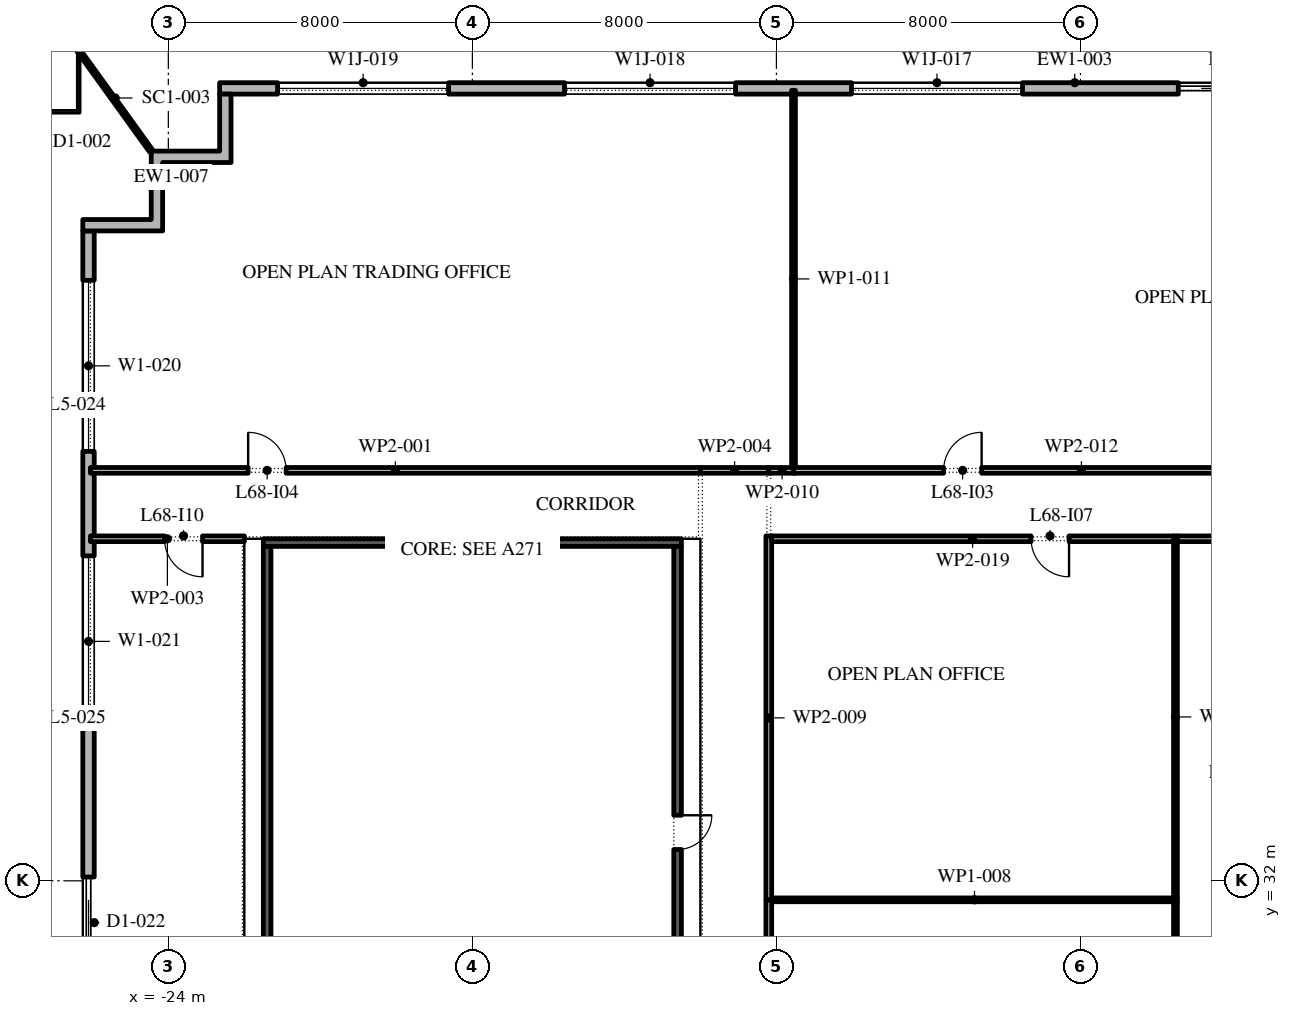
"""IFC4 building model, lengths in metres.
Left out: names, types, materials, properties, quantities, classifications, styles, units other than length and angle.
Written with IfcOpenShell. Run it as: python <this file> out.ifc"""

import sys

from ifc_helpers import new_model, si_unit, direction, frame, frame_2d, origin, place, context, subcontext, project, spatial, polyline, rectangle, outline, extrude, element, fill, save


model = new_model("IFC4")
c1 = context("Model", 3, precision=1e-05, world=origin(), true_north=direction((0.0, 1.0)))
c2 = subcontext(c1, "Body", "Model", "MODEL_VIEW")
j1 = project(units=[si_unit("LENGTHUNIT", "METRE"), si_unit("PLANEANGLEUNIT", "RADIAN")], contexts=[c1])
p1 = place(None, origin())
s1 = spatial("IfcSite", under=j1, at=p1, CompositionType="ELEMENT")
p2 = place(p1, origin())
s2 = spatial("IfcBuilding", under=s1, at=p2, CompositionType="ELEMENT")
p3 = place(p2, frame((0.0, 0.0, 313.2)))
s3 = spatial("IfcBuildingStorey", under=s2, at=p3, CompositionType="ELEMENT", Elevation=313.2)
p4 = place(p3, frame((22.35, 52.85, 0.0), z_axis=(0.0, 0.0, 1.0), x_axis=(-1.0, 0.0, 0.0)))
e1 = element("IfcWall", 1, at=p4, inside=s3, PredefinedType="STANDARD", context=c2, shape_type="SweptSolid", body=[
    extrude(rectangle(XDim=45.0, YDim=0.3, at=frame_2d((22.5, 0.0))), origin(), (0.0, 0.0, 1.0), 4.0),
])
p5 = place(p4, frame((1.375, 0.0, 0.45)))
e2 = element("IfcOpeningElement", 2, at=p5, cuts=e1, PredefinedType="OPENING", context=c2, shape_type="SweptSolid", body=[
    extrude(rectangle(XDim=4.5, YDim=2.675, at=frame_2d((2.25, 1.337))), frame((0.0, 0.16, 0.0), z_axis=(0.0, -1.0, 0.0), x_axis=(1.0, 0.0, 0.0)), (0.0, 0.0, 1.0), 0.32),
])
p6 = place(p4, frame((8.775, 0.0, 0.45)))
e3 = element("IfcOpeningElement", 3, at=p6, cuts=e1, PredefinedType="OPENING", context=c2, shape_type="SweptSolid", body=[
    extrude(rectangle(XDim=4.5, YDim=2.675, at=frame_2d((2.25, 1.337))), frame((0.0, 0.16, 0.0), z_axis=(0.0, -1.0, 0.0), x_axis=(1.0, 0.0, 0.0)), (0.0, 0.0, 1.0), 0.32),
])
p7 = place(p4, frame((17.375, 0.0, 0.0)))
e4 = element("IfcOpeningElement", 4, at=p7, cuts=e1, PredefinedType="OPENING", context=c2, shape_type="SweptSolid", body=[
    extrude(rectangle(XDim=2.4, YDim=3.125, at=frame_2d((1.2, 1.562))), frame((0.0, 0.16, 0.0), z_axis=(0.0, -1.0, 0.0), x_axis=(1.0, 0.0, 0.0)), (0.0, 0.0, 1.0), 0.32),
])
p8 = place(p4, frame((23.875, 0.0, 0.45)))
e5 = element("IfcOpeningElement", 5, at=p8, cuts=e1, PredefinedType="OPENING", context=c2, shape_type="SweptSolid", body=[
    extrude(rectangle(XDim=4.5, YDim=2.675, at=frame_2d((2.25, 1.337))), frame((0.0, 0.16, 0.0), z_axis=(0.0, -1.0, 0.0), x_axis=(1.0, 0.0, 0.0)), (0.0, 0.0, 1.0), 0.32),
])
p9 = place(p4, frame((31.425, 0.0, 0.45)))
e6 = element("IfcOpeningElement", 6, at=p9, cuts=e1, PredefinedType="OPENING", context=c2, shape_type="SweptSolid", body=[
    extrude(rectangle(XDim=4.5, YDim=2.675, at=frame_2d((2.25, 1.337))), frame((0.0, 0.16, 0.0), z_axis=(0.0, -1.0, 0.0), x_axis=(1.0, 0.0, 0.0)), (0.0, 0.0, 1.0), 0.32),
])
p10 = place(p4, frame((38.975, 0.0, 0.45)))
e7 = element("IfcOpeningElement", 7, at=p10, cuts=e1, PredefinedType="OPENING", context=c2, shape_type="SweptSolid", body=[
    extrude(rectangle(XDim=4.5, YDim=2.675, at=frame_2d((2.25, 1.337))), frame((0.0, 0.16, 0.0), z_axis=(0.0, -1.0, 0.0), x_axis=(1.0, 0.0, 0.0)), (0.0, 0.0, 1.0), 0.32),
])
p11 = place(p3, frame((-26.1, 49.1, 0.0), z_axis=(0.0, 0.0, 1.0), x_axis=(0.0, -1.0, 0.0)))
e8 = element("IfcWall", 8, at=p11, inside=s3, PredefinedType="STANDARD", context=c2, shape_type="SweptSolid", body=[
    extrude(rectangle(XDim=51.5, YDim=0.3, at=frame_2d((25.75, 0.0))), origin(), (0.0, 0.0, 1.0), 4.0),
])
p12 = place(p11, frame((1.3, 0.0, 0.45)))
e9 = element("IfcOpeningElement", 9, at=p12, cuts=e8, PredefinedType="OPENING", context=c2, shape_type="SweptSolid", body=[
    extrude(rectangle(XDim=4.5, YDim=3.05, at=frame_2d((2.25, 1.525))), frame((0.0, 0.16, 0.0), z_axis=(0.0, -1.0, 0.0), x_axis=(1.0, 0.0, 0.0)), (0.0, 0.0, 1.0), 0.32),
])
p13 = place(p11, frame((8.55, 0.0, 0.45)))
e10 = element("IfcOpeningElement", 10, at=p13, cuts=e8, PredefinedType="OPENING", context=c2, shape_type="SweptSolid", body=[
    extrude(rectangle(XDim=4.5, YDim=3.05, at=frame_2d((2.25, 1.525))), frame((0.0, 0.16, 0.0), z_axis=(0.0, -1.0, 0.0), x_axis=(1.0, 0.0, 0.0)), (0.0, 0.0, 1.0), 0.32),
])
p14 = place(p11, frame((17.0, 0.0, 0.0)))
e11 = element("IfcOpeningElement", 11, at=p14, cuts=e8, PredefinedType="OPENING", context=c2, shape_type="SweptSolid", body=[
    extrude(rectangle(XDim=2.4, YDim=3.5, at=frame_2d((1.2, 1.75))), frame((0.0, 0.16, 0.0), z_axis=(0.0, -1.0, 0.0), x_axis=(1.0, 0.0, 0.0)), (0.0, 0.0, 1.0), 0.32),
])
p15 = place(p11, frame((23.35, 0.0, 0.45)))
e12 = element("IfcOpeningElement", 12, at=p15, cuts=e8, PredefinedType="OPENING", context=c2, shape_type="SweptSolid", body=[
    extrude(rectangle(XDim=4.5, YDim=3.05, at=frame_2d((2.25, 1.525))), frame((0.0, 0.16, 0.0), z_axis=(0.0, -1.0, 0.0), x_axis=(1.0, 0.0, 0.0)), (0.0, 0.0, 1.0), 0.32),
])
p16 = place(p11, frame((30.75, 0.0, 0.45)))
e13 = element("IfcOpeningElement", 13, at=p16, cuts=e8, PredefinedType="OPENING", context=c2, shape_type="SweptSolid", body=[
    extrude(rectangle(XDim=4.5, YDim=3.05, at=frame_2d((2.25, 1.525))), frame((0.0, 0.16, 0.0), z_axis=(0.0, -1.0, 0.0), x_axis=(1.0, 0.0, 0.0)), (0.0, 0.0, 1.0), 0.32),
])
p17 = place(p11, frame((38.15, 0.0, 0.45)))
e14 = element("IfcOpeningElement", 14, at=p17, cuts=e8, PredefinedType="OPENING", context=c2, shape_type="SweptSolid", body=[
    extrude(rectangle(XDim=4.5, YDim=3.05, at=frame_2d((2.25, 1.525))), frame((0.0, 0.16, 0.0), z_axis=(0.0, -1.0, 0.0), x_axis=(1.0, 0.0, 0.0)), (0.0, 0.0, 1.0), 0.32),
])
p18 = place(p11, frame((46.6, 0.0, 0.0)))
e15 = element("IfcOpeningElement", 15, at=p18, cuts=e8, PredefinedType="OPENING", context=c2, shape_type="SweptSolid", body=[
    extrude(rectangle(XDim=2.4, YDim=3.5, at=frame_2d((1.2, 1.75))), frame((0.0, 0.16, 0.0), z_axis=(0.0, -1.0, 0.0), x_axis=(1.0, 0.0, 0.0)), (0.0, 0.0, 1.0), 0.32),
])
p19 = place(p3, origin())
e16 = element("IfcWall", 16, at=p19, inside=s3, PredefinedType="STANDARD", context=c2, shape_type="SweptSolid", body=[
    extrude(outline(polyline([(-24.45, 49.4), (-24.45, 51.2), (-22.65, 51.2), (-22.65, 52.7), (-22.35, 52.7), (-22.35, 50.9), (-24.15, 50.9), (-24.15, 49.1), (-26.25, 49.1), (-26.25, 49.4), (-24.45, 49.4)])), origin(), (0.0, 0.0, 1.0), 4.0),
])
p20 = place(p3, frame((-24.45, 51.2, -0.05), z_axis=(0.0, 0.0, 1.0), x_axis=(-0.585001892545, 0.811031926448, 0.0)))
e17 = element("IfcWall", 17, at=p20, inside=s3, PredefinedType="STANDARD", context=c2, shape_type="SweptSolid", body=[
    extrude(rectangle(XDim=3.375, YDim=0.1, at=frame_2d((1.688, 0.0))), origin(), (0.0, 0.0, 1.0), 4.05),
])
p21 = place(p3, frame((-21.4, 25.75, 0.0), z_axis=(0.0, 0.0, 1.0), x_axis=(0.0, 1.0, 0.0)))
e18 = element("IfcWall", 18, at=p21, inside=s3, PredefinedType="SHEAR", context=c2, shape_type="SweptSolid", body=[
    extrude(rectangle(XDim=15.05, YDim=0.2, at=frame_2d((7.525, 0.0))), origin(), (0.0, 0.0, 1.0), 4.0),
])
p22 = place(p3, frame((-10.6, 25.75, 0.0), z_axis=(0.0, 0.0, 1.0), x_axis=(0.0, 1.0, 0.0)))
e19 = element("IfcWall", 19, at=p22, inside=s3, PredefinedType="SHEAR", context=c2, shape_type="SweptSolid", body=[
    extrude(rectangle(XDim=15.05, YDim=0.2, at=frame_2d((7.525, 0.0))), origin(), (0.0, 0.0, 1.0), 4.0),
])
p23 = place(p22, frame((7.075, 0.0, 0.0)))
e20 = element("IfcOpeningElement", 20, at=p23, cuts=e19, PredefinedType="OPENING", context=c2, shape_type="SweptSolid", body=[
    extrude(rectangle(XDim=0.9, YDim=2.1, at=frame_2d((0.45, 1.05))), frame((0.0, 0.11, 0.0), z_axis=(0.0, -1.0, 0.0), x_axis=(1.0, 0.0, 0.0)), (0.0, 0.0, 1.0), 0.22),
])
p24 = place(p3, frame((-21.5, 40.9, 0.0), z_axis=(0.0, 0.0, 1.0), x_axis=(1.0, 0.0, 0.0)))
e21 = element("IfcWall", 21, at=p24, inside=s3, PredefinedType="SHEAR", context=c2, shape_type="SweptSolid", body=[
    extrude(rectangle(XDim=11.0, YDim=0.2, at=frame_2d((5.5, 0.0))), origin(), (0.0, 0.0, 1.0), 4.0),
])
p25 = place(p3, frame((-26.05, 42.8, 0.0), z_axis=(0.0, 0.0, 1.0), x_axis=(1.0, 0.0, 0.0)))
e22 = element("IfcWall", 22, at=p25, inside=s3, PredefinedType="PARTITIONING", context=c2, shape_type="SweptSolid", body=[
    extrude(rectangle(XDim=16.05, YDim=0.15, at=frame_2d((8.025, 0.0))), origin(), (0.0, 0.0, 1.0), 4.0),
])
p26 = place(p25, frame((4.15, 0.0, 0.0)))
e23 = element("IfcOpeningElement", 23, at=p26, cuts=e22, PredefinedType="OPENING", context=c2, shape_type="SweptSolid", body=[
    extrude(rectangle(XDim=1.0, YDim=2.1, at=frame_2d((0.5, 1.05))), frame((0.0, 0.085, 0.0), z_axis=(0.0, -1.0, 0.0), x_axis=(1.0, 0.0, 0.0)), (0.0, 0.0, 1.0), 0.17),
])
p27 = place(p3, frame((-22.0, 41.0, 0.0), z_axis=(0.0, 0.0, 1.0), x_axis=(-1.0, 0.0, 0.0)))
e24 = element("IfcWall", 24, at=p27, inside=s3, PredefinedType="PARTITIONING", context=c2, shape_type="SweptSolid", body=[
    extrude(rectangle(XDim=4.05, YDim=0.15, at=frame_2d((2.025, 0.0))), origin(), (0.0, 0.0, 1.0), 4.0),
])
p28 = place(p27, frame((1.1, 0.0, 0.0)))
e25 = element("IfcOpeningElement", 25, at=p28, cuts=e24, PredefinedType="OPENING", context=c2, shape_type="SweptSolid", body=[
    extrude(rectangle(XDim=1.0, YDim=2.1, at=frame_2d((0.5, 1.05))), frame((0.0, 0.085, 0.0), z_axis=(0.0, -1.0, 0.0), x_axis=(1.0, 0.0, 0.0)), (0.0, 0.0, 1.0), 0.17),
])
p29 = place(p3, frame((-10.0, 42.8, 0.0), z_axis=(0.0, 0.0, 1.0), x_axis=(1.0, 0.0, 0.0)))
e26 = element("IfcWall", 26, at=p29, inside=s3, PredefinedType="PARTITIONING", context=c2, shape_type="SweptSolid", body=[
    extrude(rectangle(XDim=1.8, YDim=0.15, at=frame_2d((0.9, 0.0))), origin(), (0.0, 0.0, 1.0), 4.0),
])
p30 = place(p3, frame((-8.2, 31.5, 0.0), z_axis=(0.0, 0.0, 1.0), x_axis=(0.0, -1.0, 0.0)))
e27 = element("IfcWall", 27, at=p30, inside=s3, PredefinedType="PARTITIONING", context=c2, shape_type="SweptSolid", body=[
    extrude(rectangle(XDim=5.95, YDim=0.15, at=frame_2d((2.975, 0.0))), origin(), (0.0, 0.0, 1.0), 4.0),
])
p31 = place(p30, frame((3.1, 0.0, 0.0)))
e28 = element("IfcOpeningElement", 28, at=p31, cuts=e27, PredefinedType="OPENING", context=c2, shape_type="SweptSolid", body=[
    extrude(rectangle(XDim=1.0, YDim=2.1, at=frame_2d((0.5, 1.05))), frame((0.0, 0.085, 0.0), z_axis=(0.0, -1.0, 0.0), x_axis=(1.0, 0.0, 0.0)), (0.0, 0.0, 1.0), 0.17),
])
p32 = place(p3, frame((-8.125, 31.5, 0.0), z_axis=(0.0, 0.0, 1.0), x_axis=(1.0, 0.0, 0.0)))
e29 = element("IfcWall", 29, at=p32, inside=s3, PredefinedType="PARTITIONING", context=c2, shape_type="SweptSolid", body=[
    extrude(rectangle(XDim=10.675, YDim=0.1, at=frame_2d((5.337, 0.0))), origin(), (0.0, 0.0, 1.0), 4.0),
])
p33 = place(p3, frame((-8.2, 41.075, 0.0), z_axis=(0.0, 0.0, 1.0), x_axis=(0.0, -1.0, 0.0)))
e30 = element("IfcWall", 30, at=p33, inside=s3, PredefinedType="PARTITIONING", context=c2, shape_type="SweptSolid", body=[
    extrude(rectangle(XDim=9.575, YDim=0.15, at=frame_2d((4.788, 0.0))), origin(), (0.0, 0.0, 1.0), 4.0),
])
p34 = place(p3, frame((-8.2, 42.8, 0.0), z_axis=(0.0, 0.0, 1.0), x_axis=(1.0, 0.0, 0.0)))
e31 = element("IfcWall", 31, at=p34, inside=s3, PredefinedType="PARTITIONING", context=c2, shape_type="SweptSolid", body=[
    extrude(rectangle(XDim=0.7, YDim=0.15, at=frame_2d((0.35, 0.0))), origin(), (0.0, 0.0, 1.0), 4.0),
])
p35 = place(p3, frame((-7.55, 42.875, 0.0), z_axis=(0.0, 0.0, 1.0), x_axis=(0.0, 1.0, 0.0)))
e32 = element("IfcWall", 32, at=p35, inside=s3, PredefinedType="PARTITIONING", context=c2, shape_type="SweptSolid", body=[
    extrude(rectangle(XDim=9.925, YDim=0.1, at=frame_2d((4.962, 0.0))), origin(), (0.0, 0.0, 1.0), 4.0),
])
p36 = place(p3, frame((-7.55, 42.8, 0.0), z_axis=(0.0, 0.0, 1.0), x_axis=(1.0, 0.0, 0.0)))
e33 = element("IfcWall", 33, at=p36, inside=s3, PredefinedType="PARTITIONING", context=c2, shape_type="SweptSolid", body=[
    extrude(rectangle(XDim=15.15, YDim=0.15, at=frame_2d((7.575, 0.0))), origin(), (0.0, 0.0, 1.0), 4.0),
])
p37 = place(p36, frame((3.95, 0.0, 0.0)))
e34 = element("IfcOpeningElement", 34, at=p37, cuts=e33, PredefinedType="OPENING", context=c2, shape_type="SweptSolid", body=[
    extrude(rectangle(XDim=1.0, YDim=2.1, at=frame_2d((0.5, 1.05))), frame((0.0, 0.085, 0.0), z_axis=(0.0, -1.0, 0.0), x_axis=(1.0, 0.0, 0.0)), (0.0, 0.0, 1.0), 0.17),
])
p38 = place(p3, frame((2.5, 25.55, 0.0), z_axis=(0.0, 0.0, 1.0), x_axis=(0.0, 1.0, 0.0)))
e35 = element("IfcWall", 35, at=p38, inside=s3, PredefinedType="PARTITIONING", context=c2, shape_type="SweptSolid", body=[
    extrude(rectangle(XDim=5.9, YDim=0.1, at=frame_2d((2.95, 0.0))), origin(), (0.0, 0.0, 1.0), 4.0),
])
p39 = place(p3, frame((2.5, 31.55, 0.0), z_axis=(0.0, 0.0, 1.0), x_axis=(0.0, 1.0, 0.0)))
e36 = element("IfcWall", 36, at=p39, inside=s3, PredefinedType="PARTITIONING", context=c2, shape_type="SweptSolid", body=[
    extrude(rectangle(XDim=9.525, YDim=0.1, at=frame_2d((4.762, 0.0))), origin(), (0.0, 0.0, 1.0), 4.0),
])
p40 = place(p3, frame((2.45, 41.0, 0.0), z_axis=(0.0, 0.0, 1.0), x_axis=(-1.0, 0.0, 0.0)))
e37 = element("IfcWall", 37, at=p40, inside=s3, PredefinedType="PARTITIONING", context=c2, shape_type="SweptSolid", body=[
    extrude(rectangle(XDim=10.575, YDim=0.15, at=frame_2d((5.288, 0.0))), origin(), (0.0, 0.0, 1.0), 4.0),
])
p41 = place(p40, frame((2.75, 0.0, 0.0)))
e38 = element("IfcOpeningElement", 38, at=p41, cuts=e37, PredefinedType="OPENING", context=c2, shape_type="SweptSolid", body=[
    extrude(rectangle(XDim=1.0, YDim=2.1, at=frame_2d((0.5, 1.05))), frame((0.0, 0.085, 0.0), z_axis=(0.0, -1.0, 0.0), x_axis=(1.0, 0.0, 0.0)), (0.0, 0.0, 1.0), 0.17),
])
p42 = place(p3, frame((8.125, 41.0, 0.0), z_axis=(0.0, 0.0, 1.0), x_axis=(-1.0, 0.0, 0.0)))
e39 = element("IfcWall", 39, at=p42, inside=s3, PredefinedType="PARTITIONING", context=c2, shape_type="SweptSolid", body=[
    extrude(rectangle(XDim=5.575, YDim=0.15, at=frame_2d((2.788, 0.0))), origin(), (0.0, 0.0, 1.0), 4.0),
])
p43 = place(p7, origin())
e40 = element("IfcDoor", 40, at=p43, inside=s3, OperationType="DOUBLE_DOOR_SLIDING", PredefinedType="DOOR", context=c2, shape_type="SweptSolid", body=[
    extrude(rectangle(XDim=2.4, YDim=3.125, at=frame_2d((1.2, 1.562))), frame((0.0, 0.025, 0.0), z_axis=(0.0, -1.0, 0.0), x_axis=(1.0, 0.0, 0.0)), (0.0, 0.0, 1.0), 0.05),
])
fill(e4, e40)
p44 = place(p8, origin())
e41 = element("IfcWindow", 41, at=p44, inside=s3, PartitioningType="DOUBLE_PANEL_VERTICAL", PredefinedType="WINDOW", context=c2, shape_type="SweptSolid", body=[
    extrude(rectangle(XDim=4.5, YDim=2.675, at=frame_2d((2.25, 1.337))), frame((0.0, 0.03, 0.0), z_axis=(0.0, -1.0, 0.0), x_axis=(1.0, 0.0, 0.0)), (0.0, 0.0, 1.0), 0.06),
])
fill(e5, e41)
p45 = place(p9, origin())
e42 = element("IfcWindow", 42, at=p45, inside=s3, PartitioningType="DOUBLE_PANEL_VERTICAL", PredefinedType="WINDOW", context=c2, shape_type="SweptSolid", body=[
    extrude(rectangle(XDim=4.5, YDim=2.675, at=frame_2d((2.25, 1.337))), frame((0.0, 0.03, 0.0), z_axis=(0.0, -1.0, 0.0), x_axis=(1.0, 0.0, 0.0)), (0.0, 0.0, 1.0), 0.06),
])
fill(e6, e42)
p46 = place(p10, origin())
e43 = element("IfcWindow", 43, at=p46, inside=s3, PartitioningType="DOUBLE_PANEL_VERTICAL", PredefinedType="WINDOW", context=c2, shape_type="SweptSolid", body=[
    extrude(rectangle(XDim=4.5, YDim=2.675, at=frame_2d((2.25, 1.337))), frame((0.0, 0.03, 0.0), z_axis=(0.0, -1.0, 0.0), x_axis=(1.0, 0.0, 0.0)), (0.0, 0.0, 1.0), 0.06),
])
fill(e7, e43)
p47 = place(p12, origin())
e44 = element("IfcWindow", 44, at=p47, inside=s3, PartitioningType="DOUBLE_PANEL_VERTICAL", PredefinedType="WINDOW", context=c2, shape_type="SweptSolid", body=[
    extrude(rectangle(XDim=4.5, YDim=3.05, at=frame_2d((2.25, 1.525))), frame((0.0, 0.03, 0.0), z_axis=(0.0, -1.0, 0.0), x_axis=(1.0, 0.0, 0.0)), (0.0, 0.0, 1.0), 0.06),
])
fill(e9, e44)
p48 = place(p13, origin())
e45 = element("IfcWindow", 45, at=p48, inside=s3, PartitioningType="DOUBLE_PANEL_VERTICAL", PredefinedType="WINDOW", context=c2, shape_type="SweptSolid", body=[
    extrude(rectangle(XDim=4.5, YDim=3.05, at=frame_2d((2.25, 1.525))), frame((0.0, 0.03, 0.0), z_axis=(0.0, -1.0, 0.0), x_axis=(1.0, 0.0, 0.0)), (0.0, 0.0, 1.0), 0.06),
])
fill(e10, e45)
p49 = place(p14, origin())
e46 = element("IfcDoor", 46, at=p49, inside=s3, OperationType="DOUBLE_DOOR_SLIDING", PredefinedType="DOOR", context=c2, shape_type="SweptSolid", body=[
    extrude(rectangle(XDim=2.4, YDim=3.5, at=frame_2d((1.2, 1.75))), frame((0.0, 0.025, 0.0), z_axis=(0.0, -1.0, 0.0), x_axis=(1.0, 0.0, 0.0)), (0.0, 0.0, 1.0), 0.05),
])
fill(e11, e46)
p50 = place(p23, frame((0.9, 0.15, 0.0), z_axis=(0.0, 0.0, 1.0), x_axis=(-1.0, 0.0, 0.0)))
e47 = element("IfcDoor", 47, at=p50, inside=s3, OperationType="SINGLE_SWING_RIGHT", PredefinedType="DOOR", context=c2, shape_type="SweptSolid", body=[
    extrude(rectangle(XDim=0.9, YDim=2.1, at=frame_2d((0.45, 1.05))), frame((0.0, 0.1, 0.0), z_axis=(0.0, -1.0, 0.0), x_axis=(1.0, 0.0, 0.0)), (0.0, 0.0, 1.0), 0.05),
])
fill(e20, e47)
p51 = place(p37, origin())
e48 = element("IfcDoor", 48, at=p51, inside=s3, OperationType="SINGLE_SWING_LEFT", PredefinedType="DOOR", context=c2, shape_type="SweptSolid", body=[
    extrude(rectangle(XDim=1.0, YDim=2.1, at=frame_2d((0.5, 1.05))), frame((0.0, 0.025, 0.0), z_axis=(0.0, -1.0, 0.0), x_axis=(1.0, 0.0, 0.0)), (0.0, 0.0, 1.0), 0.05),
])
fill(e34, e48)
p52 = place(p26, origin())
e49 = element("IfcDoor", 49, at=p52, inside=s3, OperationType="SINGLE_SWING_RIGHT", PredefinedType="DOOR", context=c2, shape_type="SweptSolid", body=[
    extrude(rectangle(XDim=1.0, YDim=2.1, at=frame_2d((0.5, 1.05))), frame((0.0, 0.025, 0.0), z_axis=(0.0, -1.0, 0.0), x_axis=(1.0, 0.0, 0.0)), (0.0, 0.0, 1.0), 0.05),
])
fill(e23, e49)
p53 = place(p41, origin())
e50 = element("IfcDoor", 50, at=p53, inside=s3, OperationType="SINGLE_SWING_RIGHT", PredefinedType="DOOR", context=c2, shape_type="SweptSolid", body=[
    extrude(rectangle(XDim=1.0, YDim=2.1, at=frame_2d((0.5, 1.05))), frame((0.0, 0.025, 0.0), z_axis=(0.0, -1.0, 0.0), x_axis=(1.0, 0.0, 0.0)), (0.0, 0.0, 1.0), 0.05),
])
fill(e38, e50)
p54 = place(p28, origin())
e51 = element("IfcDoor", 51, at=p54, inside=s3, OperationType="SINGLE_SWING_RIGHT", PredefinedType="DOOR", context=c2, shape_type="SweptSolid", body=[
    extrude(rectangle(XDim=1.0, YDim=2.1, at=frame_2d((0.5, 1.05))), frame((0.0, 0.025, 0.0), z_axis=(0.0, -1.0, 0.0), x_axis=(1.0, 0.0, 0.0)), (0.0, 0.0, 1.0), 0.05),
])
fill(e25, e51)
save(model, sys.argv[1])
